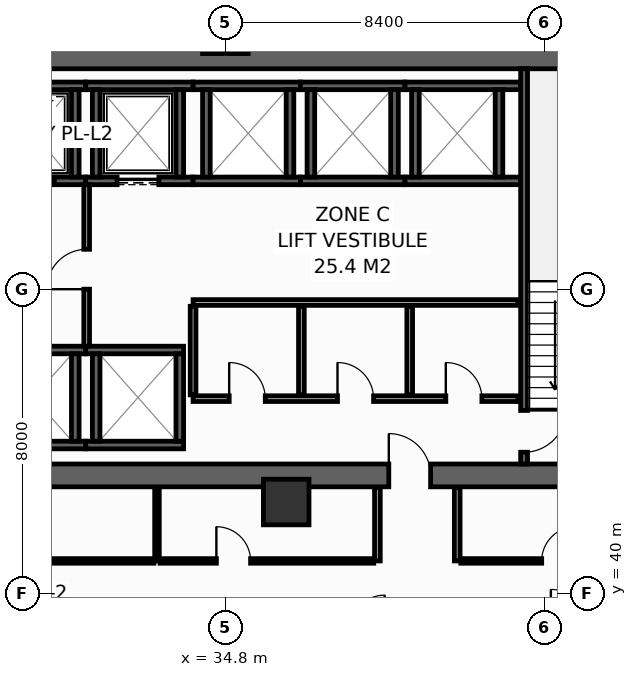
"""IFC4 building model, lengths in metres.
Left out: names, types, materials, properties, quantities, classifications, styles, units other than length and angle.
Written with IfcOpenShell. Run it as: python <this file> out.ifc"""

import sys

from ifc_helpers import new_model, si_unit, direction, frame, frame_2d, origin, origin_2d, place, context, subcontext, project, spatial, rectangle, hollow_rectangle, extrude, element, fill, save


model = new_model("IFC4")
c1 = context("Model", 3, precision=1e-05, world=origin(), true_north=direction((0.0, 1.0)))
c2 = subcontext(c1, "Body", "Model", "MODEL_VIEW")
j1 = project(units=[si_unit("LENGTHUNIT", "METRE"), si_unit("PLANEANGLEUNIT", "RADIAN")], contexts=[c1])
p1 = place(None, origin())
s1 = spatial("IfcSite", under=j1, at=p1, CompositionType="ELEMENT")
p2 = place(p1, origin())
s2 = spatial("IfcBuilding", under=s1, at=p2, CompositionType="ELEMENT")
p3 = place(p2, frame((0.0, 0.0, 69.2)))
s3 = spatial("IfcBuildingStorey", under=s2, at=p3, CompositionType="ELEMENT", Elevation=69.2)
p4 = place(p3, frame((13.5, 43.1, 0.0), z_axis=(0.0, 0.0, 1.0), x_axis=(1.0, 0.0, 0.0)))
e1 = element("IfcWall", 1, at=p4, inside=s3, PredefinedType="SHEAR", context=c2, shape_type="SweptSolid", body=[
    extrude(rectangle(XDim=32.9, YDim=0.6, at=frame_2d((16.45, 0.0))), origin(), (0.0, 0.0, 1.0), 4.15),
])
p5 = place(p4, frame((5.4, 0.0, 0.0)))
e2 = element("IfcOpeningElement", 2, at=p5, cuts=e1, PredefinedType="OPENING", context=c2, shape_type="SweptSolid", body=[
    extrude(rectangle(XDim=1.1, YDim=2.15, at=frame_2d((0.55, 1.075))), frame((0.0, 0.31, 0.0), z_axis=(0.0, -1.0, 0.0), x_axis=(1.0, 0.0, 0.0)), (0.0, 0.0, 1.0), 0.62),
])
p6 = place(p4, frame((25.6, 0.0, 0.0)))
e3 = element("IfcOpeningElement", 3, at=p6, cuts=e1, PredefinedType="OPENING", context=c2, shape_type="SweptSolid", body=[
    extrude(rectangle(XDim=1.1, YDim=2.15, at=frame_2d((0.55, 1.075))), frame((0.0, 0.31, 0.0), z_axis=(0.0, -1.0, 0.0), x_axis=(1.0, 0.0, 0.0)), (0.0, 0.0, 1.0), 0.62),
])
p7 = place(p3, frame((13.5, 54.1, 0.0), z_axis=(0.0, 0.0, 1.0), x_axis=(1.0, 0.0, 0.0)))
e4 = element("IfcWall", 4, at=p7, inside=s3, PredefinedType="SHEAR", context=c2, shape_type="SweptSolid", body=[
    extrude(rectangle(XDim=32.9, YDim=0.6, at=frame_2d((16.45, 0.0))), origin(), (0.0, 0.0, 1.0), 4.15),
])
for number, where, z_axis, x_axis in (
    (5, (34.8, 54.8, 0.0), (0.0, 0.0, 1.0), (1.0, 0.0, 0.0)),
    (6, (36.4, 42.4, 0.0), (0.0, 0.0, 1.0), (1.0, 0.0, 0.0)),
):
    element("IfcColumn", number, at=place(p3, frame(where, z_axis=z_axis, x_axis=x_axis)), inside=s3, PredefinedType="COLUMN", context=c2, shape_type="SweptSolid", body=[
        extrude(hollow_rectangle(XDim=1.2, YDim=1.2, WallThickness=0.055, at=origin_2d()), origin(), (0.0, 0.0, 1.0), 4.4),
    ])
p8 = place(p3, frame((28.375, 50.85, 0.0), z_axis=(0.0, 0.0, 1.0), x_axis=(1.0, 0.0, 0.0)))
e7 = element("IfcWall", 7, at=p8, inside=s3, PredefinedType="SHEAR", context=c2, shape_type="SweptSolid", body=[
    extrude(rectangle(XDim=2.75, YDim=0.2, at=frame_2d((1.375, 0.0))), origin(), (0.0, 0.0, 1.0), 4.15),
])
p9 = place(p8, frame((0.825, 0.0, 0.0)))
e8 = element("IfcOpeningElement", 8, at=p9, cuts=e7, PredefinedType="OPENING", context=c2, shape_type="SweptSolid", body=[
    extrude(rectangle(XDim=1.1, YDim=2.2, at=frame_2d((0.55, 1.1))), frame((0.0, 0.11, 0.0), z_axis=(0.0, -1.0, 0.0), x_axis=(1.0, 0.0, 0.0)), (0.0, 0.0, 1.0), 0.22),
])
p10 = place(p3, frame((28.375, 53.35, 0.0), z_axis=(0.0, 0.0, 1.0), x_axis=(1.0, 0.0, 0.0)))
e9 = element("IfcWall", 9, at=p10, inside=s3, PredefinedType="SHEAR", context=c2, shape_type="SweptSolid", body=[
    extrude(rectangle(XDim=2.75, YDim=0.2, at=frame_2d((1.375, 0.0))), origin(), (0.0, 0.0, 1.0), 4.15),
])
p11 = place(p3, frame((30.85, 50.95, 0.0), z_axis=(0.0, 0.0, 1.0), x_axis=(0.0, 1.0, 0.0)))
e10 = element("IfcWall", 10, at=p11, inside=s3, PredefinedType="SHEAR", context=c2, shape_type="SweptSolid", body=[
    extrude(rectangle(XDim=2.3, YDim=0.2, at=frame_2d((1.15, 0.0))), origin(), (0.0, 0.0, 1.0), 4.15),
])
p12 = place(p3, frame((31.125, 50.85, 0.0), z_axis=(0.0, 0.0, 1.0), x_axis=(1.0, 0.0, 0.0)))
e11 = element("IfcWall", 11, at=p12, inside=s3, PredefinedType="SHEAR", context=c2, shape_type="SweptSolid", body=[
    extrude(rectangle(XDim=2.825, YDim=0.2, at=frame_2d((1.413, 0.0))), origin(), (0.0, 0.0, 1.0), 4.15),
])
p13 = place(p12, frame((0.825, 0.0, 0.0)))
e12 = element("IfcOpeningElement", 12, at=p13, cuts=e11, PredefinedType="OPENING", context=c2, shape_type="SweptSolid", body=[
    extrude(rectangle(XDim=1.1, YDim=2.2, at=frame_2d((0.55, 1.1))), frame((0.0, 0.11, 0.0), z_axis=(0.0, -1.0, 0.0), x_axis=(1.0, 0.0, 0.0)), (0.0, 0.0, 1.0), 0.22),
])
p14 = place(p3, frame((31.125, 53.35, 0.0), z_axis=(0.0, 0.0, 1.0), x_axis=(1.0, 0.0, 0.0)))
e13 = element("IfcWall", 13, at=p14, inside=s3, PredefinedType="SHEAR", context=c2, shape_type="SweptSolid", body=[
    extrude(rectangle(XDim=2.825, YDim=0.2, at=frame_2d((1.413, 0.0))), origin(), (0.0, 0.0, 1.0), 4.15),
])
for number, where, z_axis, x_axis in (
    (14, (31.4, 50.95, 0.0), (0.0, 0.0, 1.0), (0.0, 1.0, 0.0)),
    (15, (33.6, 50.95, 0.0), (0.0, 0.0, 1.0), (0.0, 1.0, 0.0)),
):
    element("IfcWall", number, at=place(p3, frame(where, z_axis=z_axis, x_axis=x_axis)), inside=s3, PredefinedType="SHEAR", context=c2, shape_type="SweptSolid", body=[
        extrude(rectangle(XDim=2.3, YDim=0.2, at=frame_2d((1.15, 0.0))), origin(), (0.0, 0.0, 1.0), 4.15),
    ])
for number, where, z_axis, x_axis in (
    (16, (28.375, 43.9, 0.0), (0.0, 0.0, 1.0), (1.0, 0.0, 0.0)),
    (17, (28.375, 46.4, 0.0), (0.0, 0.0, 1.0), (1.0, 0.0, 0.0)),
):
    element("IfcWall", number, at=place(p3, frame(where, z_axis=z_axis, x_axis=x_axis)), inside=s3, PredefinedType="SHEAR", context=c2, shape_type="SweptSolid", body=[
        extrude(rectangle(XDim=2.75, YDim=0.2, at=frame_2d((1.375, 0.0))), origin(), (0.0, 0.0, 1.0), 4.15),
    ])
p15 = place(p3, frame((30.85, 44.0, 0.0), z_axis=(0.0, 0.0, 1.0), x_axis=(0.0, 1.0, 0.0)))
e18 = element("IfcWall", 18, at=p15, inside=s3, PredefinedType="SHEAR", context=c2, shape_type="SweptSolid", body=[
    extrude(rectangle(XDim=2.3, YDim=0.2, at=frame_2d((1.15, 0.0))), origin(), (0.0, 0.0, 1.0), 4.15),
])
for number, where, z_axis, x_axis in (
    (19, (31.125, 43.9, 0.0), (0.0, 0.0, 1.0), (1.0, 0.0, 0.0)),
    (20, (31.125, 46.4, 0.0), (0.0, 0.0, 1.0), (1.0, 0.0, 0.0)),
):
    element("IfcWall", number, at=place(p3, frame(where, z_axis=z_axis, x_axis=x_axis)), inside=s3, PredefinedType="SHEAR", context=c2, shape_type="SweptSolid", body=[
        extrude(rectangle(XDim=2.575, YDim=0.2, at=frame_2d((1.288, 0.0))), origin(), (0.0, 0.0, 1.0), 4.15),
    ])
for number, where, z_axis, x_axis in (
    (21, (31.4, 44.0, 0.0), (0.0, 0.0, 1.0), (0.0, 1.0, 0.0)),
    (22, (33.6, 44.0, 0.0), (0.0, 0.0, 1.0), (0.0, 1.0, 0.0)),
):
    element("IfcWall", number, at=place(p3, frame(where, z_axis=z_axis, x_axis=x_axis)), inside=s3, PredefinedType="SHEAR", context=c2, shape_type="SweptSolid", body=[
        extrude(rectangle(XDim=2.3, YDim=0.2, at=frame_2d((1.15, 0.0))), origin(), (0.0, 0.0, 1.0), 4.15),
    ])
for number, where, z_axis, x_axis in (
    (23, (33.95, 50.85, 0.0), (0.0, 0.0, 1.0), (1.0, 0.0, 0.0)),
    (24, (33.95, 53.35, 0.0), (0.0, 0.0, 1.0), (1.0, 0.0, 0.0)),
):
    element("IfcWall", number, at=place(p3, frame(where, z_axis=z_axis, x_axis=x_axis)), inside=s3, PredefinedType="SHEAR", context=c2, shape_type="SweptSolid", body=[
        extrude(rectangle(XDim=2.825, YDim=0.2, at=frame_2d((1.413, 0.0))), origin(), (0.0, 0.0, 1.0), 4.15),
    ])
for number, where, z_axis, x_axis in (
    (25, (34.3, 50.95, 0.0), (0.0, 0.0, 1.0), (0.0, 1.0, 0.0)),
    (26, (36.5, 50.95, 0.0), (0.0, 0.0, 1.0), (0.0, 1.0, 0.0)),
):
    element("IfcWall", number, at=place(p3, frame(where, z_axis=z_axis, x_axis=x_axis)), inside=s3, PredefinedType="SHEAR", context=c2, shape_type="SweptSolid", body=[
        extrude(rectangle(XDim=2.3, YDim=0.2, at=frame_2d((1.15, 0.0))), origin(), (0.0, 0.0, 1.0), 4.15),
    ])
for number, where, z_axis, x_axis in (
    (27, (36.775, 50.85, 0.0), (0.0, 0.0, 1.0), (1.0, 0.0, 0.0)),
    (28, (36.775, 53.35, 0.0), (0.0, 0.0, 1.0), (1.0, 0.0, 0.0)),
):
    element("IfcWall", number, at=place(p3, frame(where, z_axis=z_axis, x_axis=x_axis)), inside=s3, PredefinedType="SHEAR", context=c2, shape_type="SweptSolid", body=[
        extrude(rectangle(XDim=2.75, YDim=0.2, at=frame_2d((1.375, 0.0))), origin(), (0.0, 0.0, 1.0), 4.15),
    ])
for number, where, z_axis, x_axis in (
    (29, (37.05, 50.95, 0.0), (0.0, 0.0, 1.0), (0.0, 1.0, 0.0)),
    (30, (39.25, 50.95, 0.0), (0.0, 0.0, 1.0), (0.0, 1.0, 0.0)),
):
    element("IfcWall", number, at=place(p3, frame(where, z_axis=z_axis, x_axis=x_axis)), inside=s3, PredefinedType="SHEAR", context=c2, shape_type="SweptSolid", body=[
        extrude(rectangle(XDim=2.3, YDim=0.2, at=frame_2d((1.15, 0.0))), origin(), (0.0, 0.0, 1.0), 4.15),
    ])
for number, where, z_axis, x_axis in (
    (31, (39.525, 50.85, 0.0), (0.0, 0.0, 1.0), (1.0, 0.0, 0.0)),
    (32, (39.525, 53.35, 0.0), (0.0, 0.0, 1.0), (1.0, 0.0, 0.0)),
):
    element("IfcWall", number, at=place(p3, frame(where, z_axis=z_axis, x_axis=x_axis)), inside=s3, PredefinedType="SHEAR", context=c2, shape_type="SweptSolid", body=[
        extrude(rectangle(XDim=3.045, YDim=0.2, at=frame_2d((1.522, 0.0))), origin(), (0.0, 0.0, 1.0), 4.15),
    ])
for number, where, z_axis, x_axis in (
    (33, (39.8, 50.95, 0.0), (0.0, 0.0, 1.0), (0.0, 1.0, 0.0)),
    (34, (42.0, 50.95, 0.0), (0.0, 0.0, 1.0), (0.0, 1.0, 0.0)),
):
    element("IfcWall", number, at=place(p3, frame(where, z_axis=z_axis, x_axis=x_axis)), inside=s3, PredefinedType="SHEAR", context=c2, shape_type="SweptSolid", body=[
        extrude(rectangle(XDim=2.3, YDim=0.2, at=frame_2d((1.15, 0.0))), origin(), (0.0, 0.0, 1.0), 4.15),
    ])
p16 = place(p3, frame((42.66, 53.8, 0.0), z_axis=(0.0, 0.0, 1.0), x_axis=(0.0, -1.0, 0.0)))
e35 = element("IfcWall", 35, at=p16, inside=s3, PredefinedType="SHEAR", context=c2, shape_type="SweptSolid", body=[
    extrude(rectangle(XDim=10.4, YDim=0.18, at=frame_2d((5.2, 0.0))), origin(), (0.0, 0.0, 1.0), 4.15),
])
p17 = place(p16, frame((8.99, 0.0, 0.0)))
e36 = element("IfcOpeningElement", 36, at=p17, cuts=e35, PredefinedType="OPENING", context=c2, shape_type="SweptSolid", body=[
    extrude(rectangle(XDim=1.1, YDim=2.15, at=frame_2d((0.55, 1.075))), frame((0.0, 0.1, 0.0), z_axis=(0.0, -1.0, 0.0), x_axis=(1.0, 0.0, 0.0)), (0.0, 0.0, 1.0), 0.2),
])
p18 = place(p3, frame((31.15, 46.5, 0.0), z_axis=(0.0, 0.0, 1.0), x_axis=(0.0, 1.0, 0.0)))
e37 = element("IfcWall", 37, at=p18, inside=s3, PredefinedType="PARTITIONING", context=c2, shape_type="SweptSolid", body=[
    extrude(rectangle(XDim=4.25, YDim=0.15, at=frame_2d((2.125, 0.0))), origin(), (0.0, 0.0, 1.0), 4.15),
])
p19 = place(p18, frame((1.5, 0.0, 0.0)))
e38 = element("IfcOpeningElement", 38, at=p19, cuts=e37, PredefinedType="OPENING", context=c2, shape_type="SweptSolid", body=[
    extrude(rectangle(XDim=1.05, YDim=2.15, at=frame_2d((0.525, 1.075))), frame((0.0, 0.085, 0.0), z_axis=(0.0, -1.0, 0.0), x_axis=(1.0, 0.0, 0.0)), (0.0, 0.0, 1.0), 0.17),
])
p20 = place(p3, frame((33.95, 45.12, 0.0), z_axis=(0.0, 0.0, 1.0), x_axis=(1.0, 0.0, 0.0)))
e39 = element("IfcWall", 39, at=p20, inside=s3, PredefinedType="PARTITIONING", context=c2, shape_type="SweptSolid", body=[
    extrude(rectangle(XDim=8.55, YDim=0.15, at=frame_2d((4.275, 0.0))), origin(), (0.0, 0.0, 1.0), 4.15),
])
p21 = place(p20, frame((0.95, 0.0, 0.0)))
e40 = element("IfcOpeningElement", 40, at=p21, cuts=e39, PredefinedType="OPENING", context=c2, shape_type="SweptSolid", body=[
    extrude(rectangle(XDim=0.95, YDim=2.15, at=frame_2d((0.475, 1.075))), frame((0.0, 0.085, 0.0), z_axis=(0.0, -1.0, 0.0), x_axis=(1.0, 0.0, 0.0)), (0.0, 0.0, 1.0), 0.17),
])
p22 = place(p20, frame((3.8, 0.0, 0.0)))
e41 = element("IfcOpeningElement", 41, at=p22, cuts=e39, PredefinedType="OPENING", context=c2, shape_type="SweptSolid", body=[
    extrude(rectangle(XDim=0.95, YDim=2.15, at=frame_2d((0.475, 1.075))), frame((0.0, 0.085, 0.0), z_axis=(0.0, -1.0, 0.0), x_axis=(1.0, 0.0, 0.0)), (0.0, 0.0, 1.0), 0.17),
])
p23 = place(p20, frame((6.65, 0.0, 0.0)))
e42 = element("IfcOpeningElement", 42, at=p23, cuts=e39, PredefinedType="OPENING", context=c2, shape_type="SweptSolid", body=[
    extrude(rectangle(XDim=0.95, YDim=2.15, at=frame_2d((0.475, 1.075))), frame((0.0, 0.085, 0.0), z_axis=(0.0, -1.0, 0.0), x_axis=(1.0, 0.0, 0.0)), (0.0, 0.0, 1.0), 0.17),
])
p24 = place(p3, frame((33.95, 47.65, 0.0), z_axis=(0.0, 0.0, 1.0), x_axis=(1.0, 0.0, 0.0)))
e43 = element("IfcWall", 43, at=p24, inside=s3, PredefinedType="PARTITIONING", context=c2, shape_type="SweptSolid", body=[
    extrude(rectangle(XDim=8.55, YDim=0.15, at=frame_2d((4.275, 0.0))), origin(), (0.0, 0.0, 1.0), 4.15),
])
for number, where, z_axis, x_axis in (
    (44, (33.95, 45.22, 0.0), (0.0, 0.0, 1.0), (0.0, 1.0, 0.0)),
    (45, (36.8, 45.22, 0.0), (0.0, 0.0, 1.0), (0.0, 1.0, 0.0)),
    (46, (39.65, 45.22, 0.0), (0.0, 0.0, 1.0), (0.0, 1.0, 0.0)),
):
    element("IfcWall", number, at=place(p3, frame(where, z_axis=z_axis, x_axis=x_axis)), inside=s3, PredefinedType="PARTITIONING", context=c2, shape_type="SweptSolid", body=[
        extrude(rectangle(XDim=2.33, YDim=0.15, at=frame_2d((1.165, 0.0))), origin(), (0.0, 0.0, 1.0), 4.15),
    ])
for number, where, z_axis, x_axis in (
    (47, (38.8, 40.85, 0.0), (0.0, 0.0, 1.0), (0.0, 1.0, 0.0)),
    (48, (40.9, 40.85, 0.0), (0.0, 0.0, 1.0), (0.0, 1.0, 0.0)),
):
    element("IfcWall", number, at=place(p3, frame(where, z_axis=z_axis, x_axis=x_axis)), inside=s3, PredefinedType="PARTITIONING", context=c2, shape_type="SweptSolid", body=[
        extrude(rectangle(XDim=1.93, YDim=0.15, at=frame_2d((0.965, 0.0))), origin(), (0.0, 0.0, 1.0), 4.15),
    ])
p25 = place(p3, frame((33.0, 40.85, 0.0), z_axis=(0.0, 0.0, 1.0), x_axis=(0.0, 1.0, 0.0)))
e49 = element("IfcWall", 49, at=p25, inside=s3, PredefinedType="PARTITIONING", context=c2, shape_type="SweptSolid", body=[
    extrude(rectangle(XDim=1.93, YDim=0.12, at=frame_2d((0.965, 0.0))), origin(), (0.0, 0.0, 1.0), 3.335),
])
p26 = place(p3, frame((20.795, 40.85, 0.0), z_axis=(0.0, 0.0, 1.0), x_axis=(1.0, 0.0, 0.0)))
e50 = element("IfcWall", 50, at=p26, inside=s3, PredefinedType="PARTITIONING", context=c2, shape_type="SweptSolid", body=[
    extrude(rectangle(XDim=12.125, YDim=0.12, at=frame_2d((6.062, 0.0))), origin(), (0.0, 0.0, 1.0), 3.335),
])
p27 = place(p26, frame((5.612, 0.0, 0.0)))
e51 = element("IfcOpeningElement", 51, at=p27, cuts=e50, PredefinedType="OPENING", context=c2, shape_type="SweptSolid", body=[
    extrude(rectangle(XDim=0.9, YDim=2.1, at=frame_2d((0.45, 1.05))), frame((0.0, 0.07, 0.0), z_axis=(0.0, -1.0, 0.0), x_axis=(1.0, 0.0, 0.0)), (0.0, 0.0, 1.0), 0.14),
])
p28 = place(p3, frame((33.08, 40.85, 0.0), z_axis=(0.0, 0.0, 1.0), x_axis=(1.0, 0.0, 0.0)))
e52 = element("IfcWall", 52, at=p28, inside=s3, PredefinedType="PARTITIONING", context=c2, shape_type="SweptSolid", body=[
    extrude(rectangle(XDim=5.625, YDim=0.12, at=frame_2d((2.812, 0.0))), origin(), (0.0, 0.0, 1.0), 3.335),
])
p29 = place(p28, frame((1.483, 0.0, 0.0)))
e53 = element("IfcOpeningElement", 53, at=p29, cuts=e52, PredefinedType="OPENING", context=c2, shape_type="SweptSolid", body=[
    extrude(rectangle(XDim=0.9, YDim=2.1, at=frame_2d((0.45, 1.05))), frame((0.0, 0.07, 0.0), z_axis=(0.0, -1.0, 0.0), x_axis=(1.0, 0.0, 0.0)), (0.0, 0.0, 1.0), 0.14),
])
p30 = place(p3, frame((40.995, 40.85, 0.0), z_axis=(0.0, 0.0, 1.0), x_axis=(1.0, 0.0, 0.0)))
e54 = element("IfcWall", 54, at=p30, inside=s3, PredefinedType="PARTITIONING", context=c2, shape_type="SweptSolid", body=[
    extrude(rectangle(XDim=5.155, YDim=0.12, at=frame_2d((2.577, 0.0))), origin(), (0.0, 0.0, 1.0), 4.15),
])
p31 = place(p30, frame((2.128, 0.0, 0.0)))
e55 = element("IfcOpeningElement", 55, at=p31, cuts=e54, PredefinedType="OPENING", context=c2, shape_type="SweptSolid", body=[
    extrude(rectangle(XDim=0.9, YDim=2.1, at=frame_2d((0.45, 1.05))), frame((0.0, 0.07, 0.0), z_axis=(0.0, -1.0, 0.0), x_axis=(1.0, 0.0, 0.0)), (0.0, 0.0, 1.0), 0.14),
])
p32 = place(p9, origin())
e56 = element("IfcDoor", 56, at=p32, inside=s3, OperationType="SLIDING_TO_LEFT", PredefinedType="DOOR", context=c2, shape_type="SweptSolid", body=[
    extrude(rectangle(XDim=1.1, YDim=2.2, at=frame_2d((0.55, 1.1))), frame((0.0, 0.025, 0.0), z_axis=(0.0, -1.0, 0.0), x_axis=(1.0, 0.0, 0.0)), (0.0, 0.0, 1.0), 0.05),
])
fill(e8, e56)
p33 = place(p13, origin())
e57 = element("IfcDoor", 57, at=p33, inside=s3, OperationType="SLIDING_TO_LEFT", PredefinedType="DOOR", context=c2, shape_type="SweptSolid", body=[
    extrude(rectangle(XDim=1.1, YDim=2.2, at=frame_2d((0.55, 1.1))), frame((0.0, 0.025, 0.0), z_axis=(0.0, -1.0, 0.0), x_axis=(1.0, 0.0, 0.0)), (0.0, 0.0, 1.0), 0.05),
])
fill(e12, e57)
p34 = place(p17, origin())
e58 = element("IfcDoor", 58, at=p34, inside=s3, OperationType="SINGLE_SWING_LEFT", PredefinedType="DOOR", context=c2, shape_type="SweptSolid", body=[
    extrude(rectangle(XDim=1.1, YDim=2.15, at=frame_2d((0.55, 1.075))), frame((0.0, 0.025, 0.0), z_axis=(0.0, -1.0, 0.0), x_axis=(1.0, 0.0, 0.0)), (0.0, 0.0, 1.0), 0.05),
])
fill(e36, e58)
p35 = place(p6, origin())
e59 = element("IfcDoor", 59, at=p35, inside=s3, OperationType="SINGLE_SWING_LEFT", PredefinedType="DOOR", context=c2, shape_type="SweptSolid", body=[
    extrude(rectangle(XDim=1.1, YDim=2.15, at=frame_2d((0.55, 1.075))), frame((0.0, 0.025, 0.0), z_axis=(0.0, -1.0, 0.0), x_axis=(1.0, 0.0, 0.0)), (0.0, 0.0, 1.0), 0.05),
])
fill(e3, e59)
p36 = place(p19, origin())
e60 = element("IfcDoor", 60, at=p36, inside=s3, OperationType="SINGLE_SWING_LEFT", PredefinedType="DOOR", context=c2, shape_type="SweptSolid", body=[
    extrude(rectangle(XDim=1.05, YDim=2.15, at=frame_2d((0.525, 1.075))), frame((0.0, 0.025, 0.0), z_axis=(0.0, -1.0, 0.0), x_axis=(1.0, 0.0, 0.0)), (0.0, 0.0, 1.0), 0.05),
])
fill(e38, e60)
p37 = place(p21, origin())
e61 = element("IfcDoor", 61, at=p37, inside=s3, OperationType="SINGLE_SWING_LEFT", PredefinedType="DOOR", context=c2, shape_type="SweptSolid", body=[
    extrude(rectangle(XDim=0.95, YDim=2.15, at=frame_2d((0.475, 1.075))), frame((0.0, 0.025, 0.0), z_axis=(0.0, -1.0, 0.0), x_axis=(1.0, 0.0, 0.0)), (0.0, 0.0, 1.0), 0.05),
])
fill(e40, e61)
p38 = place(p22, origin())
e62 = element("IfcDoor", 62, at=p38, inside=s3, OperationType="SINGLE_SWING_LEFT", PredefinedType="DOOR", context=c2, shape_type="SweptSolid", body=[
    extrude(rectangle(XDim=0.95, YDim=2.15, at=frame_2d((0.475, 1.075))), frame((0.0, 0.025, 0.0), z_axis=(0.0, -1.0, 0.0), x_axis=(1.0, 0.0, 0.0)), (0.0, 0.0, 1.0), 0.05),
])
fill(e41, e62)
p39 = place(p23, origin())
e63 = element("IfcDoor", 63, at=p39, inside=s3, OperationType="SINGLE_SWING_LEFT", PredefinedType="DOOR", context=c2, shape_type="SweptSolid", body=[
    extrude(rectangle(XDim=0.95, YDim=2.15, at=frame_2d((0.475, 1.075))), frame((0.0, 0.025, 0.0), z_axis=(0.0, -1.0, 0.0), x_axis=(1.0, 0.0, 0.0)), (0.0, 0.0, 1.0), 0.05),
])
fill(e42, e63)
p40 = place(p29, origin())
e64 = element("IfcDoor", 64, at=p40, inside=s3, OperationType="SINGLE_SWING_LEFT", PredefinedType="DOOR", context=c2, shape_type="SweptSolid", body=[
    extrude(rectangle(XDim=0.9, YDim=2.1, at=frame_2d((0.45, 1.05))), frame((0.0, 0.025, 0.0), z_axis=(0.0, -1.0, 0.0), x_axis=(1.0, 0.0, 0.0)), (0.0, 0.0, 1.0), 0.05),
])
fill(e53, e64)
p41 = place(p31, origin())
e65 = element("IfcDoor", 65, at=p41, inside=s3, OperationType="SINGLE_SWING_RIGHT", PredefinedType="DOOR", context=c2, shape_type="SweptSolid", body=[
    extrude(rectangle(XDim=0.9, YDim=2.1, at=frame_2d((0.45, 1.05))), frame((0.0, 0.025, 0.0), z_axis=(0.0, -1.0, 0.0), x_axis=(1.0, 0.0, 0.0)), (0.0, 0.0, 1.0), 0.05),
])
fill(e55, e65)
save(model, sys.argv[1])
